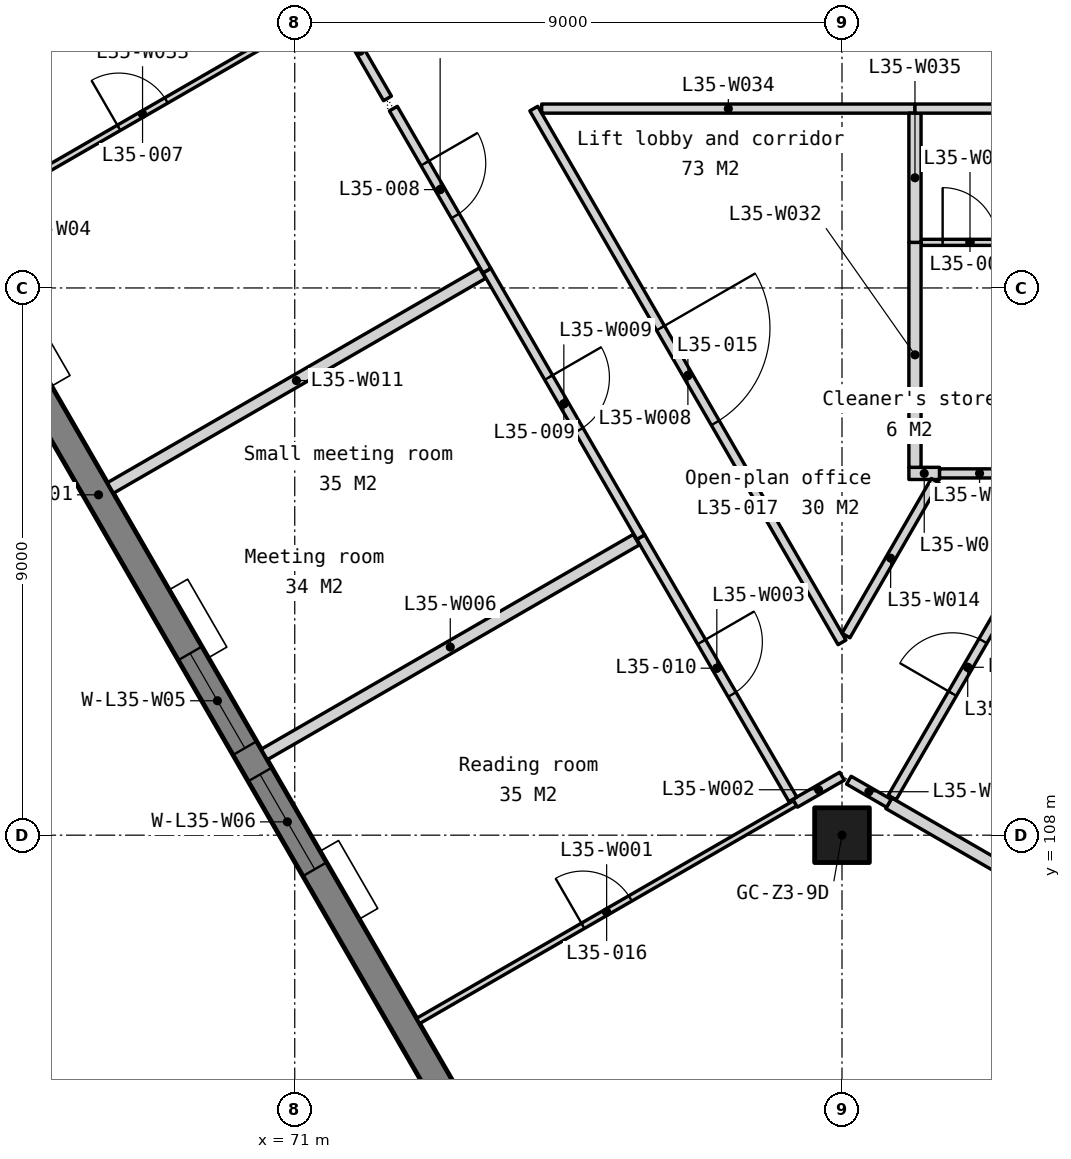
"""IFC4 building model, lengths in metres.
Left out: names, types, materials, properties, quantities, classifications, styles, units other than length and angle.
Written with IfcOpenShell. Run it as: python <this file> out.ifc"""

import sys

from ifc_helpers import new_model, si_unit, direction, frame, frame_2d, origin, origin_2d, place, context, subcontext, project, spatial, polyline, rectangle, outline, extrude, element, fill, save


model = new_model("IFC4")
c1 = context("Model", 3, precision=1e-05, world=origin(), true_north=direction((0.0, 1.0)))
c2 = subcontext(c1, "Body", "Model", "MODEL_VIEW")
j1 = project(units=[si_unit("LENGTHUNIT", "METRE"), si_unit("PLANEANGLEUNIT", "RADIAN")], contexts=[c1])
p1 = place(None, origin())
s1 = spatial("IfcSite", under=j1, at=p1, CompositionType="ELEMENT")
p2 = place(p1, origin())
s2 = spatial("IfcBuilding", under=s1, at=p2, CompositionType="ELEMENT")
p3 = place(p2, frame((0.0, 0.0, 140.3)))
s3 = spatial("IfcBuildingStorey", under=s2, at=p3, CompositionType="ELEMENT", Elevation=140.3)
p4 = place(p3, frame((80.0, 108.0, 0.0), z_axis=(0.0, 0.0, 1.0), x_axis=(1.0, 0.0, 0.0)))
e1 = element("IfcColumn", 1, at=p4, inside=s3, PredefinedType="COLUMN", context=c2, shape_type="SweptSolid", body=[
    extrude(rectangle(XDim=0.9, YDim=0.9, at=origin_2d()), origin(), (0.0, 0.0, 1.0), 3.9),
])
p5 = place(p3, frame((57.652, 131.129, -0.15), z_axis=(0.0, 0.0, 1.0), x_axis=(0.499997369791, -0.866026922331, 0.0)))
e2 = element("IfcWall", 2, at=p5, inside=s3, PredefinedType="SOLIDWALL", context=c2, shape_type="SweptSolid", body=[
    extrude(outline(polyline([(40.486, 0.0), (40.486, 3.9), (0.0, 3.9), (0.0, 0.0), (40.486, 0.0)])), frame((0.0, 0.225, 0.0), z_axis=(0.0, -1.0, 0.0), x_axis=(1.0, 0.0, 0.0)), (0.0, 0.0, 1.0), 0.45),
])
p6 = place(p5, frame((3.011, 0.0, 0.95)))
e3 = element("IfcOpeningElement", 3, at=p6, cuts=e2, PredefinedType="OPENING", context=c2, shape_type="SweptSolid", body=[
    extrude(rectangle(XDim=1.8, YDim=2.2, at=frame_2d((0.9, 1.1))), frame((0.0, 0.235, 0.0), z_axis=(0.0, -1.0, 0.0), x_axis=(1.0, 0.0, 0.0)), (0.0, 0.0, 1.0), 0.47),
])
p7 = place(p5, frame((5.311, 0.0, 0.95)))
e4 = element("IfcOpeningElement", 4, at=p7, cuts=e2, PredefinedType="OPENING", context=c2, shape_type="SweptSolid", body=[
    extrude(rectangle(XDim=1.8, YDim=2.2, at=frame_2d((0.9, 1.1))), frame((0.0, 0.235, 0.0), z_axis=(0.0, -1.0, 0.0), x_axis=(1.0, 0.0, 0.0)), (0.0, 0.0, 1.0), 0.47),
])
p8 = place(p5, frame((13.132, 0.0, 0.95)))
e5 = element("IfcOpeningElement", 5, at=p8, cuts=e2, PredefinedType="OPENING", context=c2, shape_type="SweptSolid", body=[
    extrude(rectangle(XDim=1.8, YDim=2.2, at=frame_2d((0.9, 1.1))), frame((0.0, 0.235, 0.0), z_axis=(0.0, -1.0, 0.0), x_axis=(1.0, 0.0, 0.0)), (0.0, 0.0, 1.0), 0.47),
])
p9 = place(p5, frame((15.432, 0.0, 0.95)))
e6 = element("IfcOpeningElement", 6, at=p9, cuts=e2, PredefinedType="OPENING", context=c2, shape_type="SweptSolid", body=[
    extrude(rectangle(XDim=1.8, YDim=2.2, at=frame_2d((0.9, 1.1))), frame((0.0, 0.235, 0.0), z_axis=(0.0, -1.0, 0.0), x_axis=(1.0, 0.0, 0.0)), (0.0, 0.0, 1.0), 0.47),
])
p10 = place(p5, frame((23.254, 0.0, 0.95)))
e7 = element("IfcOpeningElement", 7, at=p10, cuts=e2, PredefinedType="OPENING", context=c2, shape_type="SweptSolid", body=[
    extrude(rectangle(XDim=1.8, YDim=2.2, at=frame_2d((0.9, 1.1))), frame((0.0, 0.235, 0.0), z_axis=(0.0, -1.0, 0.0), x_axis=(1.0, 0.0, 0.0)), (0.0, 0.0, 1.0), 0.47),
])
p11 = place(p5, frame((25.554, 0.0, 0.95)))
e8 = element("IfcOpeningElement", 8, at=p11, cuts=e2, PredefinedType="OPENING", context=c2, shape_type="SweptSolid", body=[
    extrude(rectangle(XDim=1.8, YDim=2.2, at=frame_2d((0.9, 1.1))), frame((0.0, 0.235, 0.0), z_axis=(0.0, -1.0, 0.0), x_axis=(1.0, 0.0, 0.0)), (0.0, 0.0, 1.0), 0.47),
])
p12 = place(p5, frame((33.375, 0.0, 0.95)))
e9 = element("IfcOpeningElement", 9, at=p12, cuts=e2, PredefinedType="OPENING", context=c2, shape_type="SweptSolid", body=[
    extrude(rectangle(XDim=1.8, YDim=2.2, at=frame_2d((0.9, 1.1))), frame((0.0, 0.235, 0.0), z_axis=(0.0, -1.0, 0.0), x_axis=(1.0, 0.0, 0.0)), (0.0, 0.0, 1.0), 0.47),
])
p13 = place(p5, frame((35.675, 0.0, 0.95)))
e10 = element("IfcOpeningElement", 10, at=p13, cuts=e2, PredefinedType="OPENING", context=c2, shape_type="SweptSolid", body=[
    extrude(rectangle(XDim=1.8, YDim=2.2, at=frame_2d((0.9, 1.1))), frame((0.0, 0.235, 0.0), z_axis=(0.0, -1.0, 0.0), x_axis=(1.0, 0.0, 0.0)), (0.0, 0.0, 1.0), 0.47),
])
p14 = place(p3, frame((82.105, 96.067, -0.15), z_axis=(0.0, 0.0, 1.0), x_axis=(0.499997369791, 0.866026922331, 0.0)))
e11 = element("IfcWall", 11, at=p14, inside=s3, PredefinedType="SOLIDWALL", context=c2, shape_type="SweptSolid", body=[
    extrude(outline(polyline([(40.486, 0.0), (40.486, 3.9), (0.0, 3.9), (0.0, 0.0), (40.486, 0.0)])), frame((0.0, 0.225, 0.0), z_axis=(0.0, -1.0, 0.0), x_axis=(1.0, 0.0, 0.0)), (0.0, 0.0, 1.0), 0.45),
])
p15 = place(p14, frame((3.011, 0.0, 0.95)))
e12 = element("IfcOpeningElement", 12, at=p15, cuts=e11, PredefinedType="OPENING", context=c2, shape_type="SweptSolid", body=[
    extrude(rectangle(XDim=1.8, YDim=2.2, at=frame_2d((0.9, 1.1))), frame((0.0, 0.235, 0.0), z_axis=(0.0, -1.0, 0.0), x_axis=(1.0, 0.0, 0.0)), (0.0, 0.0, 1.0), 0.47),
])
p16 = place(p14, frame((5.311, 0.0, 0.95)))
e13 = element("IfcOpeningElement", 13, at=p16, cuts=e11, PredefinedType="OPENING", context=c2, shape_type="SweptSolid", body=[
    extrude(rectangle(XDim=1.8, YDim=2.2, at=frame_2d((0.9, 1.1))), frame((0.0, 0.235, 0.0), z_axis=(0.0, -1.0, 0.0), x_axis=(1.0, 0.0, 0.0)), (0.0, 0.0, 1.0), 0.47),
])
p17 = place(p14, frame((13.132, 0.0, 0.95)))
e14 = element("IfcOpeningElement", 14, at=p17, cuts=e11, PredefinedType="OPENING", context=c2, shape_type="SweptSolid", body=[
    extrude(rectangle(XDim=1.8, YDim=2.2, at=frame_2d((0.9, 1.1))), frame((0.0, 0.235, 0.0), z_axis=(0.0, -1.0, 0.0), x_axis=(1.0, 0.0, 0.0)), (0.0, 0.0, 1.0), 0.47),
])
p18 = place(p14, frame((15.432, 0.0, 0.95)))
e15 = element("IfcOpeningElement", 15, at=p18, cuts=e11, PredefinedType="OPENING", context=c2, shape_type="SweptSolid", body=[
    extrude(rectangle(XDim=1.8, YDim=2.2, at=frame_2d((0.9, 1.1))), frame((0.0, 0.235, 0.0), z_axis=(0.0, -1.0, 0.0), x_axis=(1.0, 0.0, 0.0)), (0.0, 0.0, 1.0), 0.47),
])
p19 = place(p14, frame((23.254, 0.0, 0.95)))
e16 = element("IfcOpeningElement", 16, at=p19, cuts=e11, PredefinedType="OPENING", context=c2, shape_type="SweptSolid", body=[
    extrude(rectangle(XDim=1.8, YDim=2.2, at=frame_2d((0.9, 1.1))), frame((0.0, 0.235, 0.0), z_axis=(0.0, -1.0, 0.0), x_axis=(1.0, 0.0, 0.0)), (0.0, 0.0, 1.0), 0.47),
])
p20 = place(p14, frame((25.554, 0.0, 0.95)))
e17 = element("IfcOpeningElement", 17, at=p20, cuts=e11, PredefinedType="OPENING", context=c2, shape_type="SweptSolid", body=[
    extrude(rectangle(XDim=1.8, YDim=2.2, at=frame_2d((0.9, 1.1))), frame((0.0, 0.235, 0.0), z_axis=(0.0, -1.0, 0.0), x_axis=(1.0, 0.0, 0.0)), (0.0, 0.0, 1.0), 0.47),
])
p21 = place(p14, frame((33.375, 0.0, 0.95)))
e18 = element("IfcOpeningElement", 18, at=p21, cuts=e11, PredefinedType="OPENING", context=c2, shape_type="SweptSolid", body=[
    extrude(rectangle(XDim=1.8, YDim=2.2, at=frame_2d((0.9, 1.1))), frame((0.0, 0.235, 0.0), z_axis=(0.0, -1.0, 0.0), x_axis=(1.0, 0.0, 0.0)), (0.0, 0.0, 1.0), 0.47),
])
p22 = place(p14, frame((35.675, 0.0, 0.95)))
e19 = element("IfcOpeningElement", 19, at=p22, cuts=e11, PredefinedType="OPENING", context=c2, shape_type="SweptSolid", body=[
    extrude(rectangle(XDim=1.8, YDim=2.2, at=frame_2d((0.9, 1.1))), frame((0.0, 0.235, 0.0), z_axis=(0.0, -1.0, 0.0), x_axis=(1.0, 0.0, 0.0)), (0.0, 0.0, 1.0), 0.47),
])
p23 = place(p3, frame((73.029, 104.945, 0.0), z_axis=(0.0, 0.0, 1.0), x_axis=(0.866033408367, 0.4999861354, 0.0)))
e20 = element("IfcWall", 20, at=p23, inside=s3, PredefinedType="PARTITIONING", context=c2, shape_type="SweptSolid", body=[
    extrude(rectangle(XDim=7.16, YDim=0.1, at=frame_2d((3.58, 0.0))), origin(), (0.0, 0.0, 1.0), 3.75),
])
p24 = place(p23, frame((3.13, 0.0, 0.0)))
e21 = element("IfcOpeningElement", 21, at=p24, cuts=e20, PredefinedType="OPENING", context=c2, shape_type="SweptSolid", body=[
    extrude(rectangle(XDim=0.9, YDim=2.1, at=frame_2d((0.45, 1.05))), frame((0.0, 0.06, 0.0), z_axis=(0.0, -1.0, 0.0), x_axis=(1.0, 0.0, 0.0)), (0.0, 0.0, 1.0), 0.12),
])
p25 = place(p3, frame((79.23, 108.525, 0.0), z_axis=(0.0, 0.0, 1.0), x_axis=(0.865970738743, 0.500094670678, 0.0)))
e22 = element("IfcWall", 22, at=p25, inside=s3, PredefinedType="PARTITIONING", context=c2, shape_type="SweptSolid", body=[
    extrude(rectangle(XDim=0.889, YDim=0.15, at=frame_2d((0.445, 0.0))), origin(), (0.0, 0.0, 1.0), 3.75),
])
p26 = place(p3, frame((76.691, 112.903, 0.0), z_axis=(0.0, 0.0, 1.0), x_axis=(0.501707830428, -0.8650371396, 0.0)))
e23 = element("IfcWall", 23, at=p26, inside=s3, PredefinedType="PARTITIONING", context=c2, shape_type="SweptSolid", body=[
    extrude(rectangle(XDim=4.986, YDim=0.15, at=frame_2d((2.493, 0.0))), origin(), (0.0, 0.0, 1.0), 3.75),
])
p27 = place(p26, frame((1.993, 0.0, 0.0)))
e24 = element("IfcOpeningElement", 24, at=p27, cuts=e23, PredefinedType="OPENING", context=c2, shape_type="SweptSolid", body=[
    extrude(rectangle(XDim=1.0, YDim=2.1, at=frame_2d((0.5, 1.05))), frame((0.0, 0.085, 0.0), z_axis=(0.0, -1.0, 0.0), x_axis=(1.0, 0.0, 0.0)), (0.0, 0.0, 1.0), 0.17),
])
p28 = place(p3, frame((80.77, 108.525, 0.0), z_axis=(0.0, 0.0, 1.0), x_axis=(0.866033408367, -0.4999861354, 0.0)))
e25 = element("IfcWall", 25, at=p28, inside=s3, PredefinedType="PARTITIONING", context=c2, shape_type="SweptSolid", body=[
    extrude(rectangle(XDim=7.16, YDim=0.2, at=frame_2d((3.58, 0.0))), origin(), (0.0, 0.0, 1.0), 3.75),
])
p29 = place(p3, frame((80.113, 108.905, 0.0), z_axis=(0.0, 0.0, 1.0), x_axis=(0.865939322839, -0.50014906694, 0.0)))
e26 = element("IfcWall", 26, at=p29, inside=s3, PredefinedType="PARTITIONING", context=c2, shape_type="SweptSolid", body=[
    extrude(rectangle(XDim=0.76, YDim=0.15, at=frame_2d((0.38, 0.0))), origin(), (0.0, 0.0, 1.0), 3.75),
])
p30 = place(p3, frame((70.499, 109.327, 0.0), z_axis=(0.0, 0.0, 1.0), x_axis=(0.866010067511, 0.500026562264, 0.0)))
e27 = element("IfcWall", 27, at=p30, inside=s3, PredefinedType="PARTITIONING", context=c2, shape_type="SweptSolid", body=[
    extrude(rectangle(XDim=7.065, YDim=0.2, at=frame_2d((3.532, 0.0))), origin(), (0.0, 0.0, 1.0), 3.75),
])
p31 = place(p3, frame((74.931, 119.95, 0.0), z_axis=(0.0, 0.0, 1.0), x_axis=(0.499998319705, -0.866026373901, 0.0)))
e28 = element("IfcWall", 28, at=p31, inside=s3, PredefinedType="PARTITIONING", context=c2, shape_type="SweptSolid", body=[
    extrude(rectangle(XDim=10.138, YDim=0.15, at=frame_2d((5.069, 0.0))), origin(), (0.0, 0.0, 1.0), 3.75),
])
p32 = place(p31, frame((4.169, 0.0, 0.0)))
e29 = element("IfcOpeningElement", 29, at=p32, cuts=e28, PredefinedType="OPENING", context=c2, shape_type="SweptSolid", body=[
    extrude(rectangle(XDim=1.8, YDim=2.1, at=frame_2d((0.9, 1.05))), frame((0.0, 0.085, 0.0), z_axis=(0.0, -1.0, 0.0), x_axis=(1.0, 0.0, 0.0)), (0.0, 0.0, 1.0), 0.17),
])
p33 = place(p3, frame((74.16, 117.285, 0.0), z_axis=(0.0, 0.0, 1.0), x_axis=(0.500035650373, -0.866004820053, 0.0)))
e30 = element("IfcWall", 30, at=p33, inside=s3, PredefinedType="PARTITIONING", context=c2, shape_type="SweptSolid", body=[
    extrude(rectangle(XDim=5.061, YDim=0.15, at=frame_2d((2.53, 0.0))), origin(), (0.0, 0.0, 1.0), 3.75),
])
p34 = place(p33, frame((2.03, 0.0, 0.0)))
e31 = element("IfcOpeningElement", 31, at=p34, cuts=e30, PredefinedType="OPENING", context=c2, shape_type="SweptSolid", body=[
    extrude(rectangle(XDim=1.0, YDim=2.1, at=frame_2d((0.5, 1.05))), frame((0.0, 0.085, 0.0), z_axis=(0.0, -1.0, 0.0), x_axis=(1.0, 0.0, 0.0)), (0.0, 0.0, 1.0), 0.17),
])
p35 = place(p3, frame((80.825, 108.62, 0.0), z_axis=(0.0, 0.0, 1.0), x_axis=(0.501704805906, 0.865038893768, 0.0)))
e32 = element("IfcWall", 32, at=p35, inside=s3, PredefinedType="PARTITIONING", context=c2, shape_type="SweptSolid", body=[
    extrude(rectangle(XDim=4.951, YDim=0.15, at=frame_2d((2.476, 0.0))), origin(), (0.0, 0.0, 1.0), 3.75),
])
p36 = place(p35, frame((1.975, 0.0, 0.0)))
e33 = element("IfcOpeningElement", 33, at=p36, cuts=e32, PredefinedType="OPENING", context=c2, shape_type="SweptSolid", body=[
    extrude(rectangle(XDim=1.0, YDim=2.1, at=frame_2d((0.5, 1.05))), frame((0.0, 0.085, 0.0), z_axis=(0.0, -1.0, 0.0), x_axis=(1.0, 0.0, 0.0)), (0.0, 0.0, 1.0), 0.17),
])
p37 = place(p3, frame((67.968, 113.71, 0.0), z_axis=(0.0, 0.0, 1.0), x_axis=(0.866025031136, 0.500000645445, 0.0)))
e34 = element("IfcWall", 34, at=p37, inside=s3, PredefinedType="PARTITIONING", context=c2, shape_type="SweptSolid", body=[
    extrude(rectangle(XDim=7.065, YDim=0.2, at=frame_2d((3.532, 0.0))), origin(), (0.0, 0.0, 1.0), 3.75),
])
p38 = place(p3, frame((81.1, 113.95, 0.0), z_axis=(0.0, 0.0, 1.0), x_axis=(1.0, 0.0, 0.0)))
e35 = element("IfcWall", 35, at=p38, inside=s3, PredefinedType="PARTITIONING", context=c2, shape_type="SweptSolid", body=[
    extrude(rectangle(XDim=0.505, YDim=0.2, at=frame_2d((0.252, 0.0))), origin(), (0.0, 0.0, 1.0), 3.75),
])
p39 = place(p3, frame((80.065, 111.283, 0.0), z_axis=(0.0, 0.0, 1.0), x_axis=(0.499962090823, 0.866047289552, 0.0)))
e36 = element("IfcWall", 36, at=p39, inside=s3, PredefinedType="PARTITIONING", context=c2, shape_type="SweptSolid", body=[
    extrude(rectangle(XDim=2.94, YDim=0.15, at=frame_2d((1.47, 0.0))), origin(), (0.0, 0.0, 1.0), 3.75),
])
p40 = place(p3, frame((81.605, 113.95, 0.0), z_axis=(0.0, 0.0, 1.0), x_axis=(1.0, 0.0, 0.0)))
e37 = element("IfcWall", 37, at=p40, inside=s3, PredefinedType="PARTITIONING", context=c2, shape_type="SweptSolid", body=[
    extrude(rectangle(XDim=1.315, YDim=0.15, at=frame_2d((0.658, 0.0))), origin(), (0.0, 0.0, 1.0), 3.75),
])
p41 = place(p3, frame((72.622, 119.95, 0.0), z_axis=(0.0, 0.0, 1.0), x_axis=(0.4999536902, -0.866052139109, 0.0)))
e38 = element("IfcWall", 38, at=p41, inside=s3, PredefinedType="PARTITIONING", context=c2, shape_type="SweptSolid", body=[
    extrude(rectangle(XDim=3.077, YDim=0.15, at=frame_2d((1.539, 0.0))), origin(), (0.0, 0.0, 1.0), 3.75),
])
p42 = place(p41, frame((1.039, 0.0, 0.0)))
e39 = element("IfcOpeningElement", 39, at=p42, cuts=e38, PredefinedType="OPENING", context=c2, shape_type="SweptSolid", body=[
    extrude(rectangle(XDim=1.0, YDim=2.1, at=frame_2d((0.5, 1.05))), frame((0.0, 0.085, 0.0), z_axis=(0.0, -1.0, 0.0), x_axis=(1.0, 0.0, 0.0)), (0.0, 0.0, 1.0), 0.17),
])
p43 = place(p3, frame((81.3, 117.75, 0.0), z_axis=(0.0, 0.0, 1.0), x_axis=(1.0, 0.0, 0.0)))
e40 = element("IfcWall", 40, at=p43, inside=s3, PredefinedType="PARTITIONING", context=c2, shape_type="SweptSolid", body=[
    extrude(rectangle(XDim=1.61, YDim=0.1, at=frame_2d((0.805, 0.0))), origin(), (0.0, 0.0, 1.0), 3.75),
])
p44 = place(p43, frame((0.355, 0.0, 0.0)))
e41 = element("IfcOpeningElement", 41, at=p44, cuts=e40, PredefinedType="OPENING", context=c2, shape_type="SweptSolid", body=[
    extrude(rectangle(XDim=0.9, YDim=2.1, at=frame_2d((0.45, 1.05))), frame((0.0, 0.06, 0.0), z_axis=(0.0, -1.0, 0.0), x_axis=(1.0, 0.0, 0.0)), (0.0, 0.0, 1.0), 0.12),
])
p45 = place(p3, frame((81.2, 114.05, 0.0), z_axis=(0.0, 0.0, 1.0), x_axis=(0.0, 1.0, 0.0)))
e42 = element("IfcWall", 42, at=p45, inside=s3, PredefinedType="PARTITIONING", context=c2, shape_type="SweptSolid", body=[
    extrude(rectangle(XDim=3.7, YDim=0.2, at=frame_2d((1.85, 0.0))), origin(), (0.0, 0.0, 1.0), 3.75),
])
p46 = place(p3, frame((65.438, 118.093, 0.0), z_axis=(0.0, 0.0, 1.0), x_axis=(0.866025031136, 0.500000645445, 0.0)))
e43 = element("IfcWall", 43, at=p46, inside=s3, PredefinedType="PARTITIONING", context=c2, shape_type="SweptSolid", body=[
    extrude(rectangle(XDim=7.065, YDim=0.1, at=frame_2d((3.532, 0.0))), origin(), (0.0, 0.0, 1.0), 3.75),
])
p47 = place(p46, frame((3.083, 0.0, 0.0)))
e44 = element("IfcOpeningElement", 44, at=p47, cuts=e43, PredefinedType="OPENING", context=c2, shape_type="SweptSolid", body=[
    extrude(rectangle(XDim=0.9, YDim=2.1, at=frame_2d((0.45, 1.05))), frame((0.0, 0.06, 0.0), z_axis=(0.0, -1.0, 0.0), x_axis=(1.0, 0.0, 0.0)), (0.0, 0.0, 1.0), 0.12),
])
p48 = place(p3, frame((75.061, 119.95, 0.0), z_axis=(0.0, 0.0, 1.0), x_axis=(1.0, 0.0, 0.0)))
e45 = element("IfcWall", 45, at=p48, inside=s3, PredefinedType="PARTITIONING", context=c2, shape_type="SweptSolid", body=[
    extrude(rectangle(XDim=6.139, YDim=0.15, at=frame_2d((3.069, 0.0))), origin(), (0.0, 0.0, 1.0), 3.75),
])
p49 = place(p3, frame((81.2, 117.75, 0.0), z_axis=(0.0, 0.0, 1.0), x_axis=(0.0, 1.0, 0.0)))
e46 = element("IfcWall", 46, at=p49, inside=s3, PredefinedType="PARTITIONING", context=c2, shape_type="SweptSolid", body=[
    extrude(rectangle(XDim=2.125, YDim=0.2, at=frame_2d((1.062, 0.0))), origin(), (0.0, 0.0, 1.0), 3.75),
])
p50 = place(p3, frame((81.2, 119.95, 0.0), z_axis=(0.0, 0.0, 1.0), x_axis=(1.0, 0.0, 0.0)))
e47 = element("IfcWall", 47, at=p50, inside=s3, PredefinedType="PARTITIONING", context=c2, shape_type="SweptSolid", body=[
    extrude(rectangle(XDim=6.178, YDim=0.15, at=frame_2d((3.089, 0.0))), origin(), (0.0, 0.0, 1.0), 3.75),
])
p51 = place(p50, frame((2.589, 0.0, 0.0)))
e48 = element("IfcOpeningElement", 48, at=p51, cuts=e47, PredefinedType="OPENING", context=c2, shape_type="SweptSolid", body=[
    extrude(rectangle(XDim=1.0, YDim=2.1, at=frame_2d((0.5, 1.05))), frame((0.0, 0.085, 0.0), z_axis=(0.0, -1.0, 0.0), x_axis=(1.0, 0.0, 0.0)), (0.0, 0.0, 1.0), 0.17),
])
p52 = place(p3, frame((71.63, 121.668, 0.0), z_axis=(0.0, 0.0, 1.0), x_axis=(0.499982180423, -0.866035691677, 0.0)))
e49 = element("IfcWall", 49, at=p52, inside=s3, PredefinedType="PARTITIONING", context=c2, shape_type="SweptSolid", body=[
    extrude(rectangle(XDim=1.79, YDim=0.15, at=frame_2d((0.895, 0.0))), origin(), (0.0, 0.0, 1.0), 3.75),
])
p53 = place(p10, origin())
e50 = element("IfcWindow", 50, at=p53, inside=s3, PartitioningType="SINGLE_PANEL", PredefinedType="WINDOW", context=c2, shape_type="SweptSolid", body=[
    extrude(rectangle(XDim=1.8, YDim=2.2, at=frame_2d((0.9, 1.1))), frame((0.0, 0.03, 0.0), z_axis=(0.0, -1.0, 0.0), x_axis=(1.0, 0.0, 0.0)), (0.0, 0.0, 1.0), 0.06),
])
fill(e7, e50)
p54 = place(p11, origin())
e51 = element("IfcWindow", 51, at=p54, inside=s3, PartitioningType="SINGLE_PANEL", PredefinedType="WINDOW", context=c2, shape_type="SweptSolid", body=[
    extrude(rectangle(XDim=1.8, YDim=2.2, at=frame_2d((0.9, 1.1))), frame((0.0, 0.03, 0.0), z_axis=(0.0, -1.0, 0.0), x_axis=(1.0, 0.0, 0.0)), (0.0, 0.0, 1.0), 0.06),
])
fill(e8, e51)
p55 = place(p44, origin())
e52 = element("IfcDoor", 52, at=p55, inside=s3, OperationType="SINGLE_SWING_LEFT", PredefinedType="DOOR", context=c2, shape_type="SweptSolid", body=[
    extrude(rectangle(XDim=0.9, YDim=2.1, at=frame_2d((0.45, 1.05))), frame((0.0, 0.025, 0.0), z_axis=(0.0, -1.0, 0.0), x_axis=(1.0, 0.0, 0.0)), (0.0, 0.0, 1.0), 0.05),
])
fill(e41, e52)
p56 = place(p47, origin())
e53 = element("IfcDoor", 53, at=p56, inside=s3, OperationType="SINGLE_SWING_LEFT", PredefinedType="DOOR", context=c2, shape_type="SweptSolid", body=[
    extrude(rectangle(XDim=0.9, YDim=2.1, at=frame_2d((0.45, 1.05))), frame((0.0, 0.025, 0.0), z_axis=(0.0, -1.0, 0.0), x_axis=(1.0, 0.0, 0.0)), (0.0, 0.0, 1.0), 0.05),
])
fill(e44, e53)
p57 = place(p42, origin())
e54 = element("IfcDoor", 54, at=p57, inside=s3, OperationType="SINGLE_SWING_LEFT", PredefinedType="DOOR", context=c2, shape_type="SweptSolid", body=[
    extrude(rectangle(XDim=1.0, YDim=2.1, at=frame_2d((0.5, 1.05))), frame((0.0, 0.025, 0.0), z_axis=(0.0, -1.0, 0.0), x_axis=(1.0, 0.0, 0.0)), (0.0, 0.0, 1.0), 0.05),
])
fill(e39, e54)
p58 = place(p34, origin())
e55 = element("IfcDoor", 55, at=p58, inside=s3, OperationType="SINGLE_SWING_LEFT", PredefinedType="DOOR", context=c2, shape_type="SweptSolid", body=[
    extrude(rectangle(XDim=1.0, YDim=2.1, at=frame_2d((0.5, 1.05))), frame((0.0, 0.025, 0.0), z_axis=(0.0, -1.0, 0.0), x_axis=(1.0, 0.0, 0.0)), (0.0, 0.0, 1.0), 0.05),
])
fill(e31, e55)
p59 = place(p27, origin())
e56 = element("IfcDoor", 56, at=p59, inside=s3, OperationType="SINGLE_SWING_LEFT", PredefinedType="DOOR", context=c2, shape_type="SweptSolid", body=[
    extrude(rectangle(XDim=1.0, YDim=2.1, at=frame_2d((0.5, 1.05))), frame((0.0, 0.025, 0.0), z_axis=(0.0, -1.0, 0.0), x_axis=(1.0, 0.0, 0.0)), (0.0, 0.0, 1.0), 0.05),
])
fill(e24, e56)
p60 = place(p36, origin())
e57 = element("IfcDoor", 57, at=p60, inside=s3, OperationType="SINGLE_SWING_LEFT", PredefinedType="DOOR", context=c2, shape_type="SweptSolid", body=[
    extrude(rectangle(XDim=1.0, YDim=2.1, at=frame_2d((0.5, 1.05))), frame((0.0, 0.025, 0.0), z_axis=(0.0, -1.0, 0.0), x_axis=(1.0, 0.0, 0.0)), (0.0, 0.0, 1.0), 0.05),
])
fill(e33, e57)
p61 = place(p32, origin())
e58 = element("IfcDoor", 58, at=p61, inside=s3, OperationType="SINGLE_SWING_LEFT", PredefinedType="DOOR", context=c2, shape_type="SweptSolid", body=[
    extrude(rectangle(XDim=1.8, YDim=2.1, at=frame_2d((0.9, 1.05))), frame((0.0, 0.025, 0.0), z_axis=(0.0, -1.0, 0.0), x_axis=(1.0, 0.0, 0.0)), (0.0, 0.0, 1.0), 0.05),
])
fill(e29, e58)
p62 = place(p24, origin())
e59 = element("IfcDoor", 59, at=p62, inside=s3, OperationType="SINGLE_SWING_LEFT", PredefinedType="DOOR", context=c2, shape_type="SweptSolid", body=[
    extrude(rectangle(XDim=0.9, YDim=2.1, at=frame_2d((0.45, 1.05))), frame((0.0, 0.025, 0.0), z_axis=(0.0, -1.0, 0.0), x_axis=(1.0, 0.0, 0.0)), (0.0, 0.0, 1.0), 0.05),
])
fill(e21, e59)
save(model, sys.argv[1])
